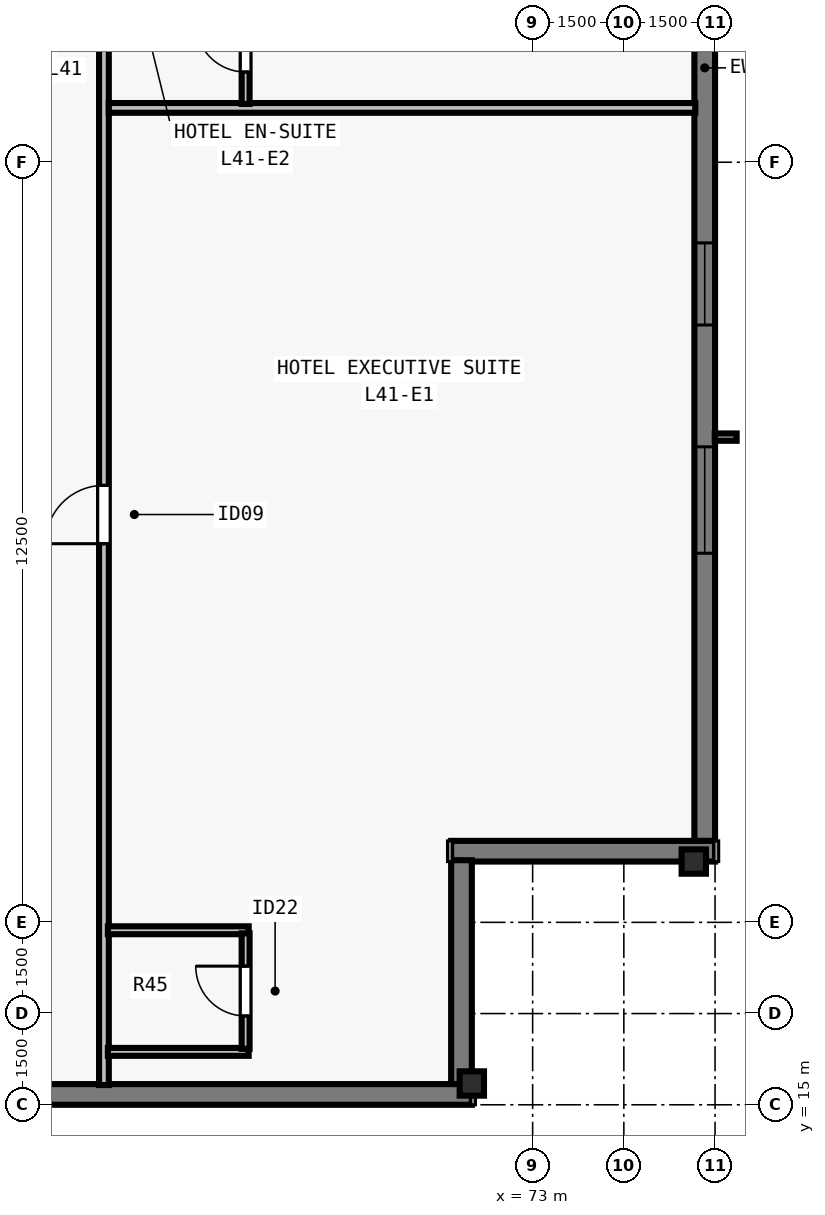
"""IFC4 building model, lengths in metres.
Left out: names, types, materials, properties, quantities, classifications, styles, units other than length and angle.
Written with IfcOpenShell. Run it as: python <this file> out.ifc"""

import sys

from ifc_helpers import new_model, si_unit, direction, frame, frame_2d, origin, origin_2d, place, context, subcontext, project, spatial, rectangle, i_section, extrude, element, fill, save


model = new_model("IFC4")
c1 = context("Model", 3, precision=1e-05, world=origin(), true_north=direction((0.0, 1.0)))
c2 = subcontext(c1, "Body", "Model", "MODEL_VIEW")
j1 = project(units=[si_unit("LENGTHUNIT", "METRE"), si_unit("PLANEANGLEUNIT", "RADIAN")], contexts=[c1])
p1 = place(None, origin())
s1 = spatial("IfcSite", under=j1, at=p1, CompositionType="ELEMENT")
p2 = place(p1, origin())
s2 = spatial("IfcBuilding", under=s1, at=p2, CompositionType="ELEMENT")
p3 = place(p2, frame((0.0, 0.0, 151.5)))
s3 = spatial("IfcBuildingStorey", under=s2, at=p3, CompositionType="ELEMENT", Elevation=151.5)
for number, where, z_axis, x_axis in (
    (1, (72.0, 15.35, 0.0), (0.0, 0.0, 1.0), (1.0, 0.0, 0.0)),
    (2, (75.65, 19.0, 0.0), (0.0, 0.0, 1.0), (0.0, 1.0, 0.0)),
):
    element("IfcColumn", number, at=place(p3, frame(where, z_axis=z_axis, x_axis=x_axis)), inside=s3, PredefinedType="COLUMN", context=c2, shape_type="SweptSolid", body=[
        extrude(i_section(OverallWidth=0.4, OverallDepth=0.4, WebThickness=0.022, FlangeThickness=0.036, at=origin_2d()), origin(), (0.0, 0.0, 1.0), 3.5),
    ])
p4 = place(p3, frame((75.83, 59.0, 0.0), z_axis=(0.0, 0.0, 1.0), x_axis=(0.0, -1.0, 0.0)))
e3 = element("IfcWall", 3, at=p4, inside=s3, PredefinedType="SOLIDWALL", context=c2, shape_type="SweptSolid", body=[
    extrude(rectangle(XDim=39.682, YDim=0.34, at=frame_2d((19.841, 0.0))), origin(), (0.0, 0.0, 1.0), 3.28),
])
p5 = place(p4, frame((4.752, 0.0, 0.8)))
e4 = element("IfcOpeningElement", 4, at=p5, cuts=e3, PredefinedType="OPENING", context=c2, shape_type="SweptSolid", body=[
    extrude(rectangle(XDim=1.75, YDim=1.66, at=frame_2d((0.875, 0.83))), frame((0.0, 0.18, 0.0), z_axis=(0.0, -1.0, 0.0), x_axis=(1.0, 0.0, 0.0)), (0.0, 0.0, 1.0), 0.36),
])
p6 = place(p4, frame((8.505, 0.0, 0.8)))
e5 = element("IfcOpeningElement", 5, at=p6, cuts=e3, PredefinedType="OPENING", context=c2, shape_type="SweptSolid", body=[
    extrude(rectangle(XDim=1.35, YDim=1.66, at=frame_2d((0.675, 0.83))), frame((0.0, 0.18, 0.0), z_axis=(0.0, -1.0, 0.0), x_axis=(1.0, 0.0, 0.0)), (0.0, 0.0, 1.0), 0.36),
])
p7 = place(p4, frame((12.709, 0.0, 0.8)))
e6 = element("IfcOpeningElement", 6, at=p7, cuts=e3, PredefinedType="OPENING", context=c2, shape_type="SweptSolid", body=[
    extrude(rectangle(XDim=1.75, YDim=1.66, at=frame_2d((0.875, 0.83))), frame((0.0, 0.18, 0.0), z_axis=(0.0, -1.0, 0.0), x_axis=(1.0, 0.0, 0.0)), (0.0, 0.0, 1.0), 0.36),
])
p8 = place(p4, frame((16.062, 0.0, 0.8)))
e7 = element("IfcOpeningElement", 7, at=p8, cuts=e3, PredefinedType="OPENING", context=c2, shape_type="SweptSolid", body=[
    extrude(rectangle(XDim=1.35, YDim=1.66, at=frame_2d((0.675, 0.83))), frame((0.0, 0.18, 0.0), z_axis=(0.0, -1.0, 0.0), x_axis=(1.0, 0.0, 0.0)), (0.0, 0.0, 1.0), 0.36),
])
p9 = place(p4, frame((18.966, 0.0, 0.8)))
e8 = element("IfcOpeningElement", 8, at=p9, cuts=e3, PredefinedType="OPENING", context=c2, shape_type="SweptSolid", body=[
    extrude(rectangle(XDim=1.75, YDim=1.66, at=frame_2d((0.875, 0.83))), frame((0.0, 0.18, 0.0), z_axis=(0.0, -1.0, 0.0), x_axis=(1.0, 0.0, 0.0)), (0.0, 0.0, 1.0), 0.36),
])
p10 = place(p4, frame((22.719, 0.0, 0.8)))
e9 = element("IfcOpeningElement", 9, at=p10, cuts=e3, PredefinedType="OPENING", context=c2, shape_type="SweptSolid", body=[
    extrude(rectangle(XDim=1.35, YDim=1.66, at=frame_2d((0.675, 0.83))), frame((0.0, 0.18, 0.0), z_axis=(0.0, -1.0, 0.0), x_axis=(1.0, 0.0, 0.0)), (0.0, 0.0, 1.0), 0.36),
])
p11 = place(p4, frame((29.827, 0.0, 0.8)))
e10 = element("IfcOpeningElement", 10, at=p11, cuts=e3, PredefinedType="OPENING", context=c2, shape_type="SweptSolid", body=[
    extrude(rectangle(XDim=1.35, YDim=1.66, at=frame_2d((0.675, 0.83))), frame((0.0, 0.18, 0.0), z_axis=(0.0, -1.0, 0.0), x_axis=(1.0, 0.0, 0.0)), (0.0, 0.0, 1.0), 0.36),
])
p12 = place(p4, frame((33.18, 0.0, 0.8)))
e11 = element("IfcOpeningElement", 11, at=p12, cuts=e3, PredefinedType="OPENING", context=c2, shape_type="SweptSolid", body=[
    extrude(rectangle(XDim=1.75, YDim=1.66, at=frame_2d((0.875, 0.83))), frame((0.0, 0.18, 0.0), z_axis=(0.0, -1.0, 0.0), x_axis=(1.0, 0.0, 0.0)), (0.0, 0.0, 1.0), 0.36),
])
p13 = place(p3, frame((76.0, 19.17, 0.0), z_axis=(0.0, 0.0, 1.0), x_axis=(-1.0, 0.0, 0.0)))
e12 = element("IfcWall", 12, at=p13, inside=s3, PredefinedType="SOLIDWALL", context=c2, shape_type="SweptSolid", body=[
    extrude(rectangle(XDim=4.34, YDim=0.34, at=frame_2d((2.17, 0.0))), origin(), (0.0, 0.0, 1.0), 3.28),
])
p14 = place(p3, frame((71.83, 19.022, 0.0), z_axis=(0.0, 0.0, 1.0), x_axis=(0.0, -1.0, 0.0)))
e13 = element("IfcWall", 13, at=p14, inside=s3, PredefinedType="SOLIDWALL", context=c2, shape_type="SweptSolid", body=[
    extrude(rectangle(XDim=3.704, YDim=0.34, at=frame_2d((1.852, 0.0))), origin(), (0.0, 0.0, 1.0), 3.28),
])
p15 = place(p3, frame((72.0, 15.17, 0.0), z_axis=(0.0, 0.0, 1.0), x_axis=(-1.0, 0.0, 0.0)))
e14 = element("IfcWall", 14, at=p15, inside=s3, PredefinedType="SOLIDWALL", context=c2, shape_type="SweptSolid", body=[
    extrude(rectangle(XDim=17.082, YDim=0.34, at=frame_2d((8.541, 0.0))), origin(), (0.0, 0.0, 1.0), 3.28),
])
p16 = place(p15, frame((9.166, 0.0, 0.8)))
e15 = element("IfcOpeningElement", 15, at=p16, cuts=e14, PredefinedType="OPENING", context=c2, shape_type="SweptSolid", body=[
    extrude(rectangle(XDim=1.35, YDim=1.66, at=frame_2d((0.675, 0.83))), frame((0.0, 0.18, 0.0), z_axis=(0.0, -1.0, 0.0), x_axis=(1.0, 0.0, 0.0)), (0.0, 0.0, 1.0), 0.36),
])
p17 = place(p15, frame((12.51, 0.0, 0.8)))
e16 = element("IfcOpeningElement", 16, at=p17, cuts=e14, PredefinedType="OPENING", context=c2, shape_type="SweptSolid", body=[
    extrude(rectangle(XDim=1.75, YDim=1.66, at=frame_2d((0.875, 0.83))), frame((0.0, 0.18, 0.0), z_axis=(0.0, -1.0, 0.0), x_axis=(1.0, 0.0, 0.0)), (0.0, 0.0, 1.0), 0.36),
])
p18 = place(p3, frame((65.95, 15.325, 0.0), z_axis=(0.0, 0.0, 1.0), x_axis=(0.0, 1.0, 0.0)))
e17 = element("IfcWall", 17, at=p18, inside=s3, PredefinedType="PARTITIONING", context=c2, shape_type="SweptSolid", body=[
    extrude(rectangle(XDim=47.35, YDim=0.16, at=frame_2d((23.675, 0.0))), origin(), (0.0, 0.0, 1.0), 2.555),
])
p19 = place(p18, frame((8.902, 0.0, 0.0)))
e18 = element("IfcOpeningElement", 18, at=p19, cuts=e17, PredefinedType="OPENING", context=c2, shape_type="SweptSolid", body=[
    extrude(rectangle(XDim=0.96, YDim=2.15, at=frame_2d((0.48, 1.075))), frame((0.0, 0.09, 0.0), z_axis=(0.0, -1.0, 0.0), x_axis=(1.0, 0.0, 0.0)), (0.0, 0.0, 1.0), 0.18),
])
p20 = place(p18, frame((24.309, 0.0, 0.0)))
e19 = element("IfcOpeningElement", 19, at=p20, cuts=e17, PredefinedType="OPENING", context=c2, shape_type="SweptSolid", body=[
    extrude(rectangle(XDim=0.96, YDim=2.15, at=frame_2d((0.48, 1.075))), frame((0.0, 0.09, 0.0), z_axis=(0.0, -1.0, 0.0), x_axis=(1.0, 0.0, 0.0)), (0.0, 0.0, 1.0), 0.18),
])
p21 = place(p18, frame((39.902, 0.0, 0.0)))
e20 = element("IfcOpeningElement", 20, at=p21, cuts=e17, PredefinedType="OPENING", context=c2, shape_type="SweptSolid", body=[
    extrude(rectangle(XDim=0.96, YDim=2.15, at=frame_2d((0.48, 1.075))), frame((0.0, 0.09, 0.0), z_axis=(0.0, -1.0, 0.0), x_axis=(1.0, 0.0, 0.0)), (0.0, 0.0, 1.0), 0.18),
])
for number, where, z_axis, x_axis in (
    (21, (66.015, 15.87, 0.0), (0.0, 0.0, 1.0), (1.0, 0.0, 0.0)),
    (22, (66.015, 17.87, 0.0), (0.0, 0.0, 1.0), (1.0, 0.0, 0.0)),
):
    element("IfcWall", number, at=place(p3, frame(where, z_axis=z_axis, x_axis=x_axis)), inside=s3, PredefinedType="PLUMBINGWALL", context=c2, shape_type="SweptSolid", body=[
        extrude(rectangle(XDim=2.315, YDim=0.13, at=frame_2d((1.158, 0.0))), origin(), (0.0, 0.0, 1.0), 3.28),
    ])
p22 = place(p3, frame((68.28, 15.92, 0.0), z_axis=(0.0, 0.0, 1.0), x_axis=(0.0, 1.0, 0.0)))
e23 = element("IfcWall", 23, at=p22, inside=s3, PredefinedType="PLUMBINGWALL", context=c2, shape_type="SweptSolid", body=[
    extrude(rectangle(XDim=1.9, YDim=0.13, at=frame_2d((0.95, 0.0))), origin(), (0.0, 0.0, 1.0), 3.28),
])
p23 = place(p22, frame((0.54, 0.0, 0.0)))
e24 = element("IfcOpeningElement", 24, at=p23, cuts=e23, PredefinedType="OPENING", context=c2, shape_type="SweptSolid", body=[
    extrude(rectangle(XDim=0.82, YDim=2.1, at=frame_2d((0.41, 1.05))), frame((0.0, 0.075, 0.0), z_axis=(0.0, -1.0, 0.0), x_axis=(1.0, 0.0, 0.0)), (0.0, 0.0, 1.0), 0.15),
])
p24 = place(p3, frame((66.03, 31.394, 0.0), z_axis=(0.0, 0.0, 1.0), x_axis=(1.0, 0.0, 0.0)))
e25 = element("IfcWall", 25, at=p24, inside=s3, PredefinedType="PARTITIONING", context=c2, shape_type="SweptSolid", body=[
    extrude(rectangle(XDim=9.645, YDim=0.16, at=frame_2d((4.823, 0.0))), origin(), (0.0, 0.0, 1.0), 3.28),
])
p25 = place(p3, frame((68.28, 31.458, 0.0), z_axis=(0.0, 0.0, 1.0), x_axis=(0.0, 1.0, 0.0)))
e26 = element("IfcWall", 26, at=p25, inside=s3, PredefinedType="PLUMBINGWALL", context=c2, shape_type="SweptSolid", body=[
    extrude(rectangle(XDim=1.885, YDim=0.13, at=frame_2d((0.942, 0.0))), origin(), (0.0, 0.0, 1.0), 3.28),
])
p26 = place(p25, frame((0.525, 0.0, 0.0)))
e27 = element("IfcOpeningElement", 27, at=p26, cuts=e26, PredefinedType="OPENING", context=c2, shape_type="SweptSolid", body=[
    extrude(rectangle(XDim=0.82, YDim=2.1, at=frame_2d((0.41, 1.05))), frame((0.0, 0.075, 0.0), z_axis=(0.0, -1.0, 0.0), x_axis=(1.0, 0.0, 0.0)), (0.0, 0.0, 1.0), 0.15),
])
p27 = place(p11, origin())
e28 = element("IfcWindow", 28, at=p27, inside=s3, PartitioningType="SINGLE_PANEL", PredefinedType="WINDOW", context=c2, shape_type="SweptSolid", body=[
    extrude(rectangle(XDim=1.35, YDim=1.66, at=frame_2d((0.675, 0.83))), frame((0.0, -0.05, 0.0), z_axis=(0.0, -1.0, 0.0), x_axis=(1.0, 0.0, 0.0)), (0.0, 0.0, 1.0), 0.06),
])
fill(e10, e28)
p28 = place(p12, origin())
e29 = element("IfcWindow", 29, at=p28, inside=s3, PartitioningType="SINGLE_PANEL", PredefinedType="WINDOW", context=c2, shape_type="SweptSolid", body=[
    extrude(rectangle(XDim=1.75, YDim=1.66, at=frame_2d((0.875, 0.83))), frame((0.0, -0.05, 0.0), z_axis=(0.0, -1.0, 0.0), x_axis=(1.0, 0.0, 0.0)), (0.0, 0.0, 1.0), 0.06),
])
fill(e11, e29)
p29 = place(p23, origin())
e30 = element("IfcDoor", 30, at=p29, inside=s3, OperationType="SINGLE_SWING_RIGHT", PredefinedType="DOOR", context=c2, shape_type="SweptSolid", body=[
    extrude(rectangle(XDim=0.82, YDim=2.1, at=frame_2d((0.41, 1.05))), frame((0.0, 0.025, 0.0), z_axis=(0.0, -1.0, 0.0), x_axis=(1.0, 0.0, 0.0)), (0.0, 0.0, 1.0), 0.05),
])
fill(e24, e30)
p30 = place(p19, origin())
e31 = element("IfcDoor", 31, at=p30, inside=s3, OperationType="SINGLE_SWING_LEFT", PredefinedType="DOOR", context=c2, shape_type="SweptSolid", body=[
    extrude(rectangle(XDim=0.96, YDim=2.15, at=frame_2d((0.48, 1.075))), frame((0.0, 0.025, 0.0), z_axis=(0.0, -1.0, 0.0), x_axis=(1.0, 0.0, 0.0)), (0.0, 0.0, 1.0), 0.05),
])
fill(e18, e31)
p31 = place(p26, origin())
e32 = element("IfcDoor", 32, at=p31, inside=s3, OperationType="SINGLE_SWING_RIGHT", PredefinedType="DOOR", context=c2, shape_type="SweptSolid", body=[
    extrude(rectangle(XDim=0.82, YDim=2.1, at=frame_2d((0.41, 1.05))), frame((0.0, 0.025, 0.0), z_axis=(0.0, -1.0, 0.0), x_axis=(1.0, 0.0, 0.0)), (0.0, 0.0, 1.0), 0.05),
])
fill(e27, e32)
save(model, sys.argv[1])
